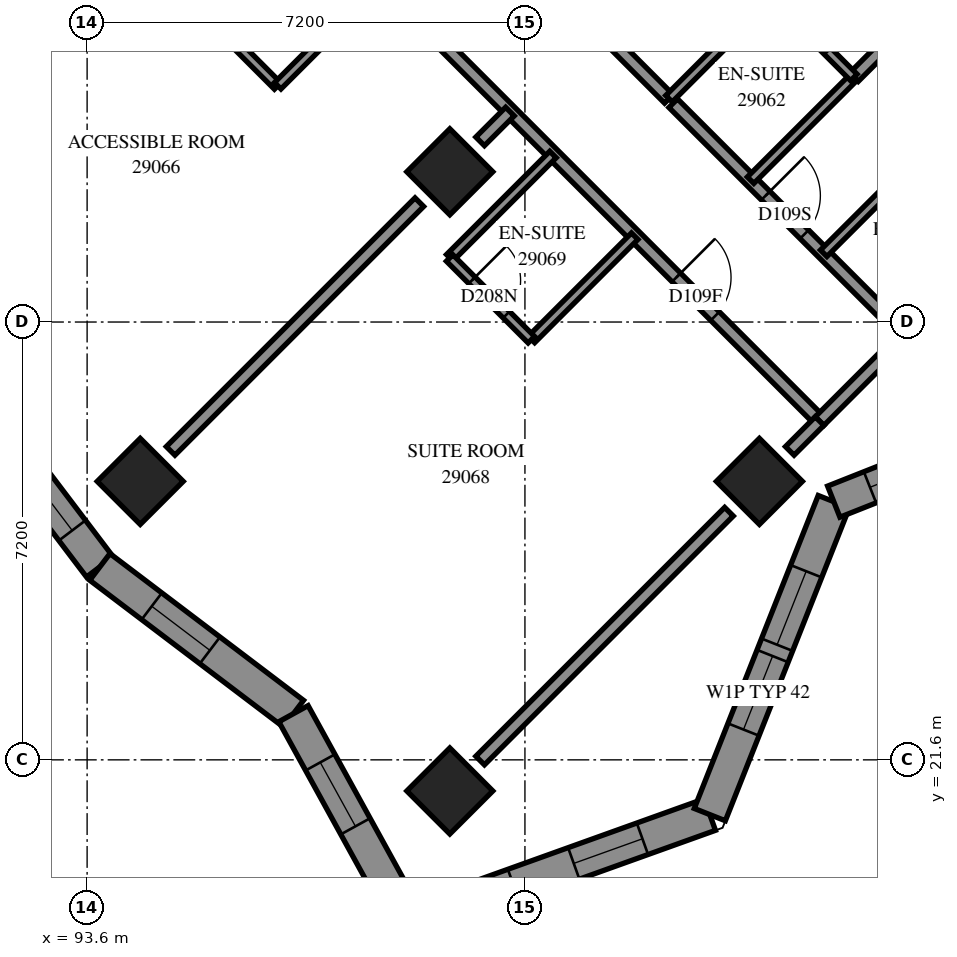
"""IFC4 building model, lengths in metres.
Left out: names, types, materials, properties, quantities, classifications, styles, units other than length and angle.
Written with IfcOpenShell. Run it as: python <this file> out.ifc"""

import sys

from ifc_helpers import new_model, si_unit, direction, frame, frame_2d, origin, origin_2d, place, context, subcontext, project, spatial, polyline, rectangle, outline, extrude, element, fill, save


model = new_model("IFC4")
c1 = context("Model", 3, precision=1e-05, world=origin(), true_north=direction((0.0, 1.0)))
c2 = subcontext(c1, "Body", "Model", "MODEL_VIEW")
j1 = project(units=[si_unit("LENGTHUNIT", "METRE"), si_unit("PLANEANGLEUNIT", "RADIAN")], contexts=[c1])
p1 = place(None, origin())
s1 = spatial("IfcSite", under=j1, at=p1, CompositionType="ELEMENT")
p2 = place(p1, origin())
s2 = spatial("IfcBuilding", under=s1, at=p2, CompositionType="ELEMENT")
p3 = place(p2, frame((0.0, 0.0, 108.4)))
s3 = spatial("IfcBuildingStorey", under=s2, at=p3, CompositionType="ELEMENT", Elevation=108.4)
for number, where, z_axis, x_axis in (
    (1, (99.565, 31.271, 0.0), (0.0, 0.0, 1.0), (0.707, -0.707, 0.0)),
    (2, (94.474, 26.18, 0.0), (0.0, 0.0, 1.0), (0.707, -0.707, 0.0)),
    (3, (104.656, 26.18, 0.0), (0.0, 0.0, 1.0), (0.707, -0.707, 0.0)),
    (4, (99.565, 21.088, 0.0), (0.0, 0.0, 1.0), (0.707, -0.707, 0.0)),
):
    element("IfcColumn", number, at=place(p3, frame(where, z_axis=z_axis, x_axis=x_axis)), inside=s3, PredefinedType="COLUMN", context=c2, shape_type="SweptSolid", body=[
        extrude(rectangle(XDim=1.0, YDim=1.0, at=origin_2d()), origin(), (0.0, 0.0, 1.0), 3.1),
    ])
p4 = place(p3, frame((98.885, 18.922, 0.0), z_axis=(0.0, 0.0, 1.0), x_axis=(0.941256607, 0.3376921672, 0.0)))
e5 = element("IfcWall", 5, at=p4, inside=s3, PredefinedType="SOLIDWALL", context=c2, shape_type="SweptSolid", body=[
    extrude(outline(polyline([(-0.234, -0.275), (5.389, -0.275), (5.14, 0.275), (0.234, 0.275), (-0.234, -0.275)])), origin(), (0.0, 0.0, 1.0), 3.1),
])
p5 = place(p4, frame((0.634, 0.0, 0.5)))
e6 = element("IfcOpeningElement", 6, at=p5, cuts=e5, PredefinedType="OPENING", context=c2, shape_type="SweptSolid", body=[
    extrude(rectangle(XDim=1.2, YDim=2.45, at=frame_2d((0.6, 1.225))), frame((0.0, 0.285, 0.0), z_axis=(0.0, -1.0, 0.0), x_axis=(1.0, 0.0, 0.0)), (0.0, 0.0, 1.0), 0.57),
])
p6 = place(p4, frame((2.887, 0.0, 0.5)))
e7 = element("IfcOpeningElement", 7, at=p6, cuts=e5, PredefinedType="OPENING", context=c2, shape_type="SweptSolid", body=[
    extrude(rectangle(XDim=1.2, YDim=2.45, at=frame_2d((0.6, 1.225))), frame((0.0, 0.285, 0.0), z_axis=(0.0, -1.0, 0.0), x_axis=(1.0, 0.0, 0.0)), (0.0, 0.0, 1.0), 0.57),
])
p7 = place(p3, frame((103.84, 20.7, 0.0), z_axis=(0.0, 0.0, 1.0), x_axis=(0.368236509, 0.9297321514, 0.0)))
e8 = element("IfcWall", 8, at=p7, inside=s3, PredefinedType="SOLIDWALL", context=c2, shape_type="SweptSolid", body=[
    extrude(outline(polyline([(-0.124, -0.275), (5.417, -0.275), (5.654, 0.275), (0.124, 0.275), (-0.124, -0.275)])), origin(), (0.0, 0.0, 1.0), 3.1),
])
p8 = place(p7, frame((1.504, 0.0, 0.5)))
e9 = element("IfcOpeningElement", 9, at=p8, cuts=e8, PredefinedType="OPENING", context=c2, shape_type="SweptSolid", body=[
    extrude(rectangle(XDim=1.3, YDim=2.45, at=frame_2d((0.65, 1.225))), frame((0.0, 0.285, 0.0), z_axis=(0.0, -1.0, 0.0), x_axis=(1.0, 0.0, 0.0)), (0.0, 0.0, 1.0), 0.57),
])
p9 = place(p7, frame((3.005, 0.0, 0.5)))
e10 = element("IfcOpeningElement", 10, at=p9, cuts=e8, PredefinedType="OPENING", context=c2, shape_type="SweptSolid", body=[
    extrude(rectangle(XDim=1.3, YDim=2.45, at=frame_2d((0.65, 1.225))), frame((0.0, 0.285, 0.0), z_axis=(0.0, -1.0, 0.0), x_axis=(1.0, 0.0, 0.0)), (0.0, 0.0, 1.0), 0.57),
])
p10 = place(p3, frame((105.879, 25.846, 0.0), z_axis=(0.0, 0.0, 1.0), x_axis=(0.9297321514, 0.368236509, 0.0)))
e11 = element("IfcWall", 11, at=p10, inside=s3, PredefinedType="SOLIDWALL", context=c2, shape_type="SweptSolid", body=[
    extrude(outline(polyline([(0.119, -0.275), (5.66, -0.275), (5.411, 0.275), (-0.119, 0.275), (0.119, -0.275)])), origin(), (0.0, 0.0, 1.0), 3.1),
])
p11 = place(p10, frame((0.641, 0.0, 0.5)))
e12 = element("IfcOpeningElement", 12, at=p11, cuts=e11, PredefinedType="OPENING", context=c2, shape_type="SweptSolid", body=[
    extrude(rectangle(XDim=1.2, YDim=2.45, at=frame_2d((0.6, 1.225))), frame((0.0, 0.285, 0.0), z_axis=(0.0, -1.0, 0.0), x_axis=(1.0, 0.0, 0.0)), (0.0, 0.0, 1.0), 0.57),
])
p12 = place(p10, frame((3.146, 0.0, 0.5)))
e13 = element("IfcOpeningElement", 13, at=p12, cuts=e11, PredefinedType="OPENING", context=c2, shape_type="SweptSolid", body=[
    extrude(rectangle(XDim=1.2, YDim=2.45, at=frame_2d((0.6, 1.225))), frame((0.0, 0.285, 0.0), z_axis=(0.0, -1.0, 0.0), x_axis=(1.0, 0.0, 0.0)), (0.0, 0.0, 1.0), 0.57),
])
p13 = place(p3, frame((91.408, 27.94, 0.0), z_axis=(0.0, 0.0, 1.0), x_axis=(0.604094045, -0.7969130347, 0.0)))
e14 = element("IfcWall", 14, at=p13, inside=s3, PredefinedType="SOLIDWALL", context=c2, shape_type="SweptSolid", body=[
    extrude(outline(polyline([(0.038, -0.275), (4.013, -0.275), (3.937, 0.275), (-0.038, 0.275), (0.038, -0.275)])), origin(), (0.0, 0.0, 1.0), 3.1),
])
p14 = place(p13, frame((0.422, 0.0, 0.5)))
e15 = element("IfcOpeningElement", 15, at=p14, cuts=e14, PredefinedType="OPENING", context=c2, shape_type="SweptSolid", body=[
    extrude(rectangle(XDim=1.3, YDim=2.45, at=frame_2d((0.65, 1.225))), frame((0.0, 0.285, 0.0), z_axis=(0.0, -1.0, 0.0), x_axis=(1.0, 0.0, 0.0)), (0.0, 0.0, 1.0), 0.57),
])
p15 = place(p13, frame((1.923, 0.0, 0.5)))
e16 = element("IfcOpeningElement", 16, at=p15, cuts=e14, PredefinedType="OPENING", context=c2, shape_type="SweptSolid", body=[
    extrude(rectangle(XDim=1.3, YDim=2.45, at=frame_2d((0.65, 1.225))), frame((0.0, 0.285, 0.0), z_axis=(0.0, -1.0, 0.0), x_axis=(1.0, 0.0, 0.0)), (0.0, 0.0, 1.0), 0.57),
])
p16 = place(p3, frame((93.809, 24.773, 0.0), z_axis=(0.0, 0.0, 1.0), x_axis=(0.7969168783, -0.6040889745, 0.0)))
e17 = element("IfcWall", 17, at=p16, inside=s3, PredefinedType="SOLIDWALL", context=c2, shape_type="SweptSolid", body=[
    extrude(outline(polyline([(-0.038, -0.275), (3.937, -0.275), (4.054, 0.275), (0.038, 0.275), (-0.038, -0.275)])), origin(), (0.0, 0.0, 1.0), 3.1),
])
p17 = place(p16, frame((1.071, 0.0, 0.5)))
e18 = element("IfcOpeningElement", 18, at=p17, cuts=e17, PredefinedType="OPENING", context=c2, shape_type="SweptSolid", body=[
    extrude(rectangle(XDim=1.2, YDim=2.45, at=frame_2d((0.6, 1.225))), frame((0.0, 0.285, 0.0), z_axis=(0.0, -1.0, 0.0), x_axis=(1.0, 0.0, 0.0)), (0.0, 0.0, 1.0), 0.57),
])
p18 = place(p3, frame((96.993, 22.359, 0.0), z_axis=(0.0, 0.0, 1.0), x_axis=(0.4821574431, -0.876084585, 0.0)))
e19 = element("IfcWall", 19, at=p18, inside=s3, PredefinedType="SOLIDWALL", context=c2, shape_type="SweptSolid", body=[
    extrude(outline(polyline([(0.059, -0.275), (4.158, -0.275), (3.689, 0.275), (-0.059, 0.275), (0.059, -0.275)])), origin(), (0.0, 0.0, 1.0), 3.1),
])
p19 = place(p18, frame((0.915, 0.0, 0.5)))
e20 = element("IfcOpeningElement", 20, at=p19, cuts=e19, PredefinedType="OPENING", context=c2, shape_type="SweptSolid", body=[
    extrude(rectangle(XDim=1.2, YDim=2.45, at=frame_2d((0.6, 1.225))), frame((0.0, 0.285, 0.0), z_axis=(0.0, -1.0, 0.0), x_axis=(1.0, 0.0, 0.0)), (0.0, 0.0, 1.0), 0.57),
])
p20 = place(p3, frame((92.004, 40.819, 0.0), z_axis=(0.0, 0.0, 1.0), x_axis=(0.7071067812, -0.7071067812, 0.0)))
e21 = element("IfcWall", 21, at=p20, inside=s3, PredefinedType="PARTITIONING", context=c2, shape_type="SweptSolid", body=[
    extrude(rectangle(XDim=19.298, YDim=0.2, at=frame_2d((9.649, 0.0))), origin(), (0.0, 0.0, 1.0), 3.1),
])
p21 = place(p20, frame((3.489, 0.0, 0.0)))
e22 = element("IfcOpeningElement", 22, at=p21, cuts=e21, PredefinedType="OPENING", context=c2, shape_type="SweptSolid", body=[
    extrude(rectangle(XDim=0.9, YDim=2.1, at=frame_2d((0.45, 1.05))), frame((0.0, 0.11, 0.0), z_axis=(0.0, -1.0, 0.0), x_axis=(1.0, 0.0, 0.0)), (0.0, 0.0, 1.0), 0.22),
])
p22 = place(p20, frame((9.319, 0.0, 0.0)))
e23 = element("IfcOpeningElement", 23, at=p22, cuts=e21, PredefinedType="OPENING", context=c2, shape_type="SweptSolid", body=[
    extrude(rectangle(XDim=0.9, YDim=2.1, at=frame_2d((0.45, 1.05))), frame((0.0, 0.11, 0.0), z_axis=(0.0, -1.0, 0.0), x_axis=(1.0, 0.0, 0.0)), (0.0, 0.0, 1.0), 0.22),
])
p23 = place(p20, frame((15.961, 0.0, 0.0)))
e24 = element("IfcOpeningElement", 24, at=p23, cuts=e21, PredefinedType="OPENING", context=c2, shape_type="SweptSolid", body=[
    extrude(rectangle(XDim=0.9, YDim=2.1, at=frame_2d((0.45, 1.05))), frame((0.0, 0.11, 0.0), z_axis=(0.0, -1.0, 0.0), x_axis=(1.0, 0.0, 0.0)), (0.0, 0.0, 1.0), 0.22),
])
p24 = place(p3, frame((89.881, 31.771, 0.0), z_axis=(0.0, 0.0, 1.0), x_axis=(0.7071067812, 0.7071067812, 0.0)))
e25 = element("IfcWall", 25, at=p24, inside=s3, PredefinedType="PARTITIONING", context=c2, shape_type="SweptSolid", body=[
    extrude(rectangle(XDim=5.787, YDim=0.2, at=frame_2d((2.893, 0.0))), origin(), (0.0, 0.0, 1.0), 3.1),
])
p25 = place(p3, frame((100.063, 21.589, 0.0), z_axis=(0.0, 0.0, 1.0), x_axis=(0.7071067812, 0.7071067812, 0.0)))
e26 = element("IfcWall", 26, at=p25, inside=s3, PredefinedType="PARTITIONING", context=c2, shape_type="SweptSolid", body=[
    extrude(rectangle(XDim=5.787, YDim=0.2, at=frame_2d((2.893, 0.0))), origin(), (0.0, 0.0, 1.0), 2.6),
])
p26 = place(p3, frame((94.973, 26.681, 0.0), z_axis=(0.0, 0.0, 1.0), x_axis=(0.7071067812, 0.7071067812, 0.0)))
e27 = element("IfcWall", 27, at=p26, inside=s3, PredefinedType="PARTITIONING", context=c2, shape_type="SweptSolid", body=[
    extrude(rectangle(XDim=5.784, YDim=0.2, at=frame_2d((2.892, 0.0))), origin(), (0.0, 0.0, 1.0), 3.1),
])
p27 = place(p3, frame((103.239, 32.399, 0.0), z_axis=(0.0, 0.0, 1.0), x_axis=(0.7071067812, -0.7071067812, 0.0)))
e28 = element("IfcWall", 28, at=p27, inside=s3, PredefinedType="PARTITIONING", context=c2, shape_type="SweptSolid", body=[
    extrude(rectangle(XDim=5.399, YDim=0.2, at=frame_2d((2.7, 0.0))), origin(), (0.0, 0.0, 1.0), 3.1),
])
p28 = place(p27, frame((2.15, 0.0, 0.0)))
e29 = element("IfcOpeningElement", 29, at=p28, cuts=e28, PredefinedType="OPENING", context=c2, shape_type="SweptSolid", body=[
    extrude(rectangle(XDim=0.9, YDim=2.1, at=frame_2d((0.45, 1.05))), frame((0.0, 0.11, 0.0), z_axis=(0.0, -1.0, 0.0), x_axis=(1.0, 0.0, 0.0)), (0.0, 0.0, 1.0), 0.22),
])
p29 = place(p3, frame((103.168, 32.47, 0.0), z_axis=(0.0, 0.0, 1.0), x_axis=(-0.7067858967, 0.7074275201, 0.0)))
e30 = element("IfcWall", 30, at=p29, inside=s3, PredefinedType="PARTITIONING", context=c2, shape_type="SweptSolid", body=[
    extrude(rectangle(XDim=5.299, YDim=0.2, at=frame_2d((2.65, 0.0))), origin(), (0.0, 0.0, 1.0), 3.1),
])
p30 = place(p29, frame((2.043, 0.0, 0.0)))
e31 = element("IfcOpeningElement", 31, at=p30, cuts=e30, PredefinedType="OPENING", context=c2, shape_type="SweptSolid", body=[
    extrude(rectangle(XDim=0.9, YDim=2.1, at=frame_2d((0.45, 1.05))), frame((0.0, 0.11, 0.0), z_axis=(0.0, -1.0, 0.0), x_axis=(1.0, 0.0, 0.0)), (0.0, 0.0, 1.0), 0.22),
])
p31 = place(p3, frame((106.211, 32.827, 0.0), z_axis=(0.0, 0.0, 1.0), x_axis=(0.7071067812, 0.7071067812, 0.0)))
e32 = element("IfcWall", 32, at=p31, inside=s3, PredefinedType="PARTITIONING", context=c2, shape_type="SweptSolid", body=[
    extrude(rectangle(XDim=4.45, YDim=0.2, at=frame_2d((2.225, 0.0))), origin(), (0.0, 0.0, 1.0), 3.1),
])
p32 = place(p3, frame((94.471, 34.945, 0.0), z_axis=(0.0, 0.0, 1.0), x_axis=(0.7067942478, -0.7074191764, 0.0)))
e33 = element("IfcWall", 33, at=p32, inside=s3, PredefinedType="PARTITIONING", context=c2, shape_type="SweptSolid", body=[
    extrude(rectangle(XDim=3.2, YDim=0.15, at=frame_2d((1.6, 0.0))), origin(), (0.0, 0.0, 1.0), 3.1),
])
p33 = place(p32, frame((1.206, 0.0, 0.0)))
e34 = element("IfcOpeningElement", 34, at=p33, cuts=e33, PredefinedType="OPENING", context=c2, shape_type="SweptSolid", body=[
    extrude(rectangle(XDim=0.8, YDim=2.1, at=frame_2d((0.4, 1.05))), frame((0.0, 0.085, 0.0), z_axis=(0.0, -1.0, 0.0), x_axis=(1.0, 0.0, 0.0)), (0.0, 0.0, 1.0), 0.17),
])
for number, where, z_axis, x_axis in (
    (35, (96.735, 32.685, 0.0), (0.0, 0.0, 1.0), (0.707, 0.707, 0.0)),
    (36, (103.169, 32.473, 0.0), (0.0, 0.0, 1.0), (0.707, 0.707, 0.0)),
    (37, (99.563, 29.857, 0.0), (0.0, 0.0, 1.0), (0.707, 0.707, 0.0)),
    (38, (100.907, 28.513, 0.0), (0.0, 0.0, 1.0), (0.707, 0.707, 0.0)),
):
    element("IfcWall", number, at=place(p3, frame(where, z_axis=z_axis, x_axis=x_axis)), inside=s3, PredefinedType="PARTITIONING", context=c2, shape_type="SweptSolid", body=[
        extrude(rectangle(XDim=2.401, YDim=0.15, at=frame_2d((1.201, 0.0))), origin(), (0.0, 0.0, 1.0), 3.1),
    ])
for number, where, z_axis, x_axis in (
    (39, (104.511, 31.133, 0.0), (0.0, 0.0, 1.0), (0.708, 0.707, 0.0)),
    (40, (105.713, 29.931, 0.0), (0.0, 0.0, 1.0), (0.708, 0.707, 0.0)),
):
    element("IfcWall", number, at=place(p3, frame(where, z_axis=z_axis, x_axis=x_axis)), inside=s3, PredefinedType="PARTITIONING", context=c2, shape_type="SweptSolid", body=[
        extrude(rectangle(XDim=2.4, YDim=0.15, at=frame_2d((1.2, 0.0))), origin(), (0.0, 0.0, 1.0), 3.1),
    ])
p34 = place(p3, frame((105.645, 27.171, 0.0), z_axis=(0.0, 0.0, 1.0), x_axis=(0.7071067812, 0.7071067812, 0.0)))
e41 = element("IfcWall", 41, at=p34, inside=s3, PredefinedType="PARTITIONING", context=c2, shape_type="SweptSolid", body=[
    extrude(rectangle(XDim=2.0, YDim=0.2, at=frame_2d((1.0, 0.0))), origin(), (0.0, 0.0, 1.0), 2.6),
])
p35 = place(p3, frame((99.561, 29.853, 0.0), z_axis=(0.0, 0.0, 1.0), x_axis=(0.7071067812, -0.7071067812, 0.0)))
e42 = element("IfcWall", 42, at=p35, inside=s3, PredefinedType="PARTITIONING", context=c2, shape_type="SweptSolid", body=[
    extrude(rectangle(XDim=1.901, YDim=0.15, at=frame_2d((0.95, 0.0))), origin(), (0.0, 0.0, 1.0), 3.1),
])
p36 = place(p35, frame((0.519, 0.0, 0.0)))
e43 = element("IfcOpeningElement", 43, at=p36, cuts=e42, PredefinedType="OPENING", context=c2, shape_type="SweptSolid", body=[
    extrude(rectangle(XDim=0.8, YDim=2.1, at=frame_2d((0.4, 1.05))), frame((0.0, 0.085, 0.0), z_axis=(0.0, -1.0, 0.0), x_axis=(1.0, 0.0, 0.0)), (0.0, 0.0, 1.0), 0.17),
])
p37 = place(p3, frame((104.865, 34.167, 0.0), z_axis=(0.0, 0.0, 1.0), x_axis=(0.7071067812, -0.7071067812, 0.0)))
e44 = element("IfcWall", 44, at=p37, inside=s3, PredefinedType="PARTITIONING", context=c2, shape_type="SweptSolid", body=[
    extrude(rectangle(XDim=1.901, YDim=0.15, at=frame_2d((0.95, 0.0))), origin(), (0.0, 0.0, 1.0), 3.1),
])
p38 = place(p37, frame((0.493, 0.0, 0.0)))
e45 = element("IfcOpeningElement", 45, at=p38, cuts=e44, PredefinedType="OPENING", context=c2, shape_type="SweptSolid", body=[
    extrude(rectangle(XDim=0.8, YDim=2.1, at=frame_2d((0.4, 1.05))), frame((0.0, 0.085, 0.0), z_axis=(0.0, -1.0, 0.0), x_axis=(1.0, 0.0, 0.0)), (0.0, 0.0, 1.0), 0.17),
])
p39 = place(p3, frame((105.155, 26.681, 0.0), z_axis=(0.0, 0.0, 1.0), x_axis=(0.7071067812, 0.7071067812, 0.0)))
e46 = element("IfcWall", 46, at=p39, inside=s3, PredefinedType="PARTITIONING", context=c2, shape_type="SweptSolid", body=[
    extrude(rectangle(XDim=0.693, YDim=0.2, at=frame_2d((0.346, 0.0))), origin(), (0.0, 0.0, 1.0), 2.6),
])
p40 = place(p3, frame((100.063, 31.771, 0.0), z_axis=(0.0, 0.0, 1.0), x_axis=(0.7071067812, 0.7071067812, 0.0)))
e47 = element("IfcWall", 47, at=p40, inside=s3, PredefinedType="PARTITIONING", context=c2, shape_type="SweptSolid", body=[
    extrude(rectangle(XDim=0.693, YDim=0.2, at=frame_2d((0.346, 0.0))), origin(), (0.0, 0.0, 1.0), 3.1),
])
p41 = place(p5, origin())
e48 = element("IfcWindow", 48, at=p41, inside=s3, PartitioningType="SINGLE_PANEL", PredefinedType="WINDOW", context=c2, shape_type="SweptSolid", body=[
    extrude(rectangle(XDim=1.2, YDim=2.45, at=frame_2d((0.6, 1.225))), frame((0.0, 0.155, 0.0), z_axis=(0.0, -1.0, 0.0), x_axis=(1.0, 0.0, 0.0)), (0.0, 0.0, 1.0), 0.06),
])
fill(e6, e48)
p42 = place(p6, origin())
e49 = element("IfcWindow", 49, at=p42, inside=s3, PartitioningType="SINGLE_PANEL", PredefinedType="WINDOW", context=c2, shape_type="SweptSolid", body=[
    extrude(rectangle(XDim=1.2, YDim=2.45, at=frame_2d((0.6, 1.225))), frame((0.0, 0.155, 0.0), z_axis=(0.0, -1.0, 0.0), x_axis=(1.0, 0.0, 0.0)), (0.0, 0.0, 1.0), 0.06),
])
fill(e7, e49)
p43 = place(p8, origin())
e50 = element("IfcWindow", 50, at=p43, inside=s3, PartitioningType="SINGLE_PANEL", PredefinedType="WINDOW", context=c2, shape_type="SweptSolid", body=[
    extrude(rectangle(XDim=1.3, YDim=2.45, at=frame_2d((0.65, 1.225))), frame((0.0, 0.155, 0.0), z_axis=(0.0, -1.0, 0.0), x_axis=(1.0, 0.0, 0.0)), (0.0, 0.0, 1.0), 0.06),
])
fill(e9, e50)
p44 = place(p9, origin())
e51 = element("IfcWindow", 51, at=p44, inside=s3, PartitioningType="SINGLE_PANEL", PredefinedType="WINDOW", context=c2, shape_type="SweptSolid", body=[
    extrude(rectangle(XDim=1.3, YDim=2.45, at=frame_2d((0.65, 1.225))), frame((0.0, 0.155, 0.0), z_axis=(0.0, -1.0, 0.0), x_axis=(1.0, 0.0, 0.0)), (0.0, 0.0, 1.0), 0.06),
])
fill(e10, e51)
p45 = place(p11, origin())
e52 = element("IfcWindow", 52, at=p45, inside=s3, PartitioningType="SINGLE_PANEL", PredefinedType="WINDOW", context=c2, shape_type="SweptSolid", body=[
    extrude(rectangle(XDim=1.2, YDim=2.45, at=frame_2d((0.6, 1.225))), frame((0.0, 0.155, 0.0), z_axis=(0.0, -1.0, 0.0), x_axis=(1.0, 0.0, 0.0)), (0.0, 0.0, 1.0), 0.06),
])
fill(e12, e52)
p46 = place(p15, origin())
e53 = element("IfcWindow", 53, at=p46, inside=s3, PartitioningType="SINGLE_PANEL", PredefinedType="WINDOW", context=c2, shape_type="SweptSolid", body=[
    extrude(rectangle(XDim=1.3, YDim=2.45, at=frame_2d((0.65, 1.225))), frame((0.0, 0.155, 0.0), z_axis=(0.0, -1.0, 0.0), x_axis=(1.0, 0.0, 0.0)), (0.0, 0.0, 1.0), 0.06),
])
fill(e16, e53)
p47 = place(p17, origin())
e54 = element("IfcWindow", 54, at=p47, inside=s3, PartitioningType="SINGLE_PANEL", PredefinedType="WINDOW", context=c2, shape_type="SweptSolid", body=[
    extrude(rectangle(XDim=1.2, YDim=2.45, at=frame_2d((0.6, 1.225))), frame((0.0, 0.155, 0.0), z_axis=(0.0, -1.0, 0.0), x_axis=(1.0, 0.0, 0.0)), (0.0, 0.0, 1.0), 0.06),
])
fill(e18, e54)
p48 = place(p19, origin())
e55 = element("IfcWindow", 55, at=p48, inside=s3, PartitioningType="SINGLE_PANEL", PredefinedType="WINDOW", context=c2, shape_type="SweptSolid", body=[
    extrude(rectangle(XDim=1.2, YDim=2.45, at=frame_2d((0.6, 1.225))), frame((0.0, 0.155, 0.0), z_axis=(0.0, -1.0, 0.0), x_axis=(1.0, 0.0, 0.0)), (0.0, 0.0, 1.0), 0.06),
])
fill(e20, e55)
p49 = place(p23, origin())
e56 = element("IfcDoor", 56, at=p49, inside=s3, OperationType="SINGLE_SWING_RIGHT", PredefinedType="DOOR", context=c2, shape_type="SweptSolid", body=[
    extrude(rectangle(XDim=0.9, YDim=2.1, at=frame_2d((0.45, 1.05))), frame((0.0, 0.025, 0.0), z_axis=(0.0, -1.0, 0.0), x_axis=(1.0, 0.0, 0.0)), (0.0, 0.0, 1.0), 0.05),
])
fill(e24, e56)
p50 = place(p36, origin())
e57 = element("IfcDoor", 57, at=p50, inside=s3, OperationType="SINGLE_SWING_RIGHT", PredefinedType="DOOR", context=c2, shape_type="SweptSolid", body=[
    extrude(rectangle(XDim=0.8, YDim=2.1, at=frame_2d((0.4, 1.05))), frame((0.0, 0.025, 0.0), z_axis=(0.0, -1.0, 0.0), x_axis=(1.0, 0.0, 0.0)), (0.0, 0.0, 1.0), 0.05),
])
fill(e43, e57)
p51 = place(p28, origin())
e58 = element("IfcDoor", 58, at=p51, inside=s3, OperationType="SINGLE_SWING_RIGHT", PredefinedType="DOOR", context=c2, shape_type="SweptSolid", body=[
    extrude(rectangle(XDim=0.9, YDim=2.1, at=frame_2d((0.45, 1.05))), frame((0.0, 0.025, 0.0), z_axis=(0.0, -1.0, 0.0), x_axis=(1.0, 0.0, 0.0)), (0.0, 0.0, 1.0), 0.05),
])
fill(e29, e58)
save(model, sys.argv[1])
